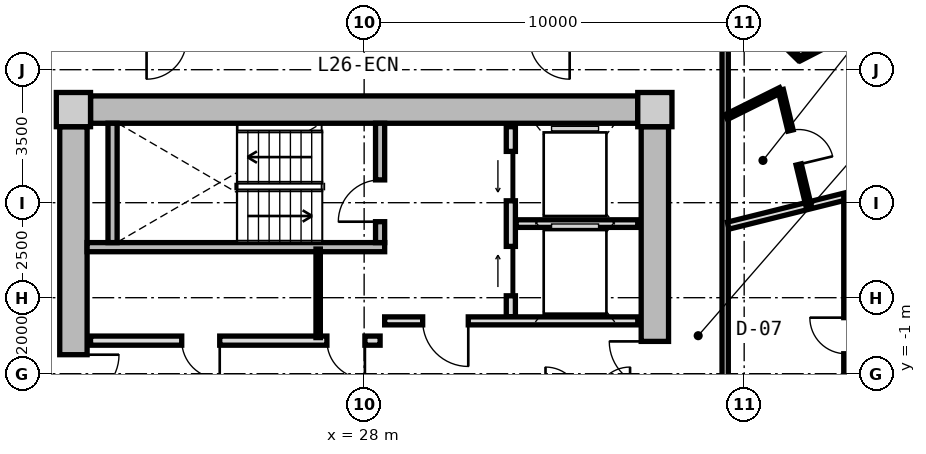
"""IFC4 building model, lengths in metres.
Left out: names, types, materials, properties, quantities, classifications, styles, units other than length and angle.
Written with IfcOpenShell. Run it as: python <this file> out.ifc"""

import sys

from ifc_helpers import new_model, si_unit, direction, frame, frame_2d, origin, origin_2d, place, context, subcontext, project, spatial, rectangle, extrude, source, transform, mapped, element, fill, save


model = new_model("IFC4")
c1 = context("Model", 3, precision=1e-05, world=origin(), true_north=direction((0.0, 1.0)))
c2 = subcontext(c1, "Body", "Model", "MODEL_VIEW")
j1 = project(units=[si_unit("LENGTHUNIT", "METRE"), si_unit("PLANEANGLEUNIT", "RADIAN")], contexts=[c1])
p1 = place(None, origin())
s1 = spatial("IfcSite", under=j1, at=p1, CompositionType="ELEMENT")
p2 = place(p1, origin())
s2 = spatial("IfcBuilding", under=s1, at=p2, CompositionType="ELEMENT")
p3 = place(p2, frame((0.0, 0.0, 87.1)))
s3 = spatial("IfcBuildingStorey", under=s2, at=p3, CompositionType="ELEMENT", Elevation=87.1)
m1 = source(origin(), c2, "Body", "SweptSolid", [
    extrude(rectangle(XDim=0.9, YDim=0.9, at=origin_2d()), origin(), (0.0, 0.0, 1.0), 3.05),
])
for number, where, z_axis, x_axis in (
    (1, (35.65, 5.95, 0.0), (0.0, 0.0, 1.0), (1.0, 0.0, 0.0)),
    (2, (20.35, 5.95, 0.0), (0.0, 0.0, 1.0), (1.0, 0.0, 0.0)),
):
    element("IfcColumn", number, at=place(p3, frame(where, z_axis=z_axis, x_axis=x_axis)), inside=s3, PredefinedType="COLUMN", context=c2, shape_type="MappedRepresentation", body=[
        mapped(m1, transform((0.0, 0.0, 0.0), x_axis=(1.0, 0.0, 0.0), y_axis=(0.0, 1.0, 0.0), z_axis=(0.0, 0.0, 1.0), scale=1.0)),
    ])
m2 = source(origin(), c2, "Body", "SweptSolid", [
    extrude(rectangle(XDim=14.4, YDim=0.72, at=frame_2d((7.2, 0.0))), origin(), (0.0, 0.0, 1.0), 2.79),
])
p4 = place(p3, frame((20.8, 5.95, 0.0), z_axis=(0.0, 0.0, 1.0), x_axis=(1.0, 0.0, 0.0)))
e3 = element("IfcWall", 3, at=p4, inside=s3, PredefinedType="SHEAR", context=c2, shape_type="MappedRepresentation", body=[
    mapped(m2, transform((0.0, 0.0, 0.0), x_axis=(1.0, 0.0, 0.0), y_axis=(0.0, 1.0, 0.0), z_axis=(0.0, 0.0, 1.0), scale=1.0)),
])
m3 = source(origin(), c2, "Body", "SweptSolid", [
    extrude(rectangle(XDim=11.0, YDim=0.72, at=frame_2d((5.5, 0.0))), origin(), (0.0, 0.0, 1.0), 2.79),
])
p5 = place(p3, frame((20.35, -5.5, 0.0), z_axis=(0.0, 0.0, 1.0), x_axis=(0.0, 1.0, 0.0)))
e4 = element("IfcWall", 4, at=p5, inside=s3, PredefinedType="SHEAR", context=c2, shape_type="MappedRepresentation", body=[
    mapped(m3, transform((0.0, 0.0, 0.0), x_axis=(1.0, 0.0, 0.0), y_axis=(0.0, 1.0, 0.0), z_axis=(0.0, 0.0, 1.0), scale=1.0)),
])
p6 = place(p5, frame((3.8, 0.0, 0.0)))
e5 = element("IfcOpeningElement", 5, at=p6, cuts=e4, PredefinedType="OPENING", context=c2, shape_type="SweptSolid", body=[
    extrude(rectangle(XDim=1.2, YDim=2.15, at=frame_2d((0.6, 1.075))), frame((0.0, 0.37, 0.0), z_axis=(0.0, -1.0, 0.0), x_axis=(1.0, 0.0, 0.0)), (0.0, 0.0, 1.0), 0.74),
])
p7 = place(p3, frame((35.65, 5.5, 0.0), z_axis=(0.0, 0.0, 1.0), x_axis=(0.0, -1.0, 0.0)))
e6 = element("IfcWall", 6, at=p7, inside=s3, PredefinedType="SHEAR", context=c2, shape_type="MappedRepresentation", body=[
    mapped(m3, transform((0.0, 0.0, 0.0), x_axis=(1.0, 0.0, 0.0), y_axis=(0.0, 1.0, 0.0), z_axis=(0.0, 0.0, 1.0), scale=1.0)),
])
p8 = place(p7, frame((5.65, 0.0, 0.0)))
e7 = element("IfcOpeningElement", 7, at=p8, cuts=e6, PredefinedType="OPENING", context=c2, shape_type="SweptSolid", body=[
    extrude(rectangle(XDim=1.2, YDim=2.15, at=frame_2d((0.6, 1.075))), frame((0.0, 0.37, 0.0), z_axis=(0.0, -1.0, 0.0), x_axis=(1.0, 0.0, 0.0)), (0.0, 0.0, 1.0), 0.74),
])
m4 = source(origin(), c2, "Body", "SweptSolid", [
    extrude(rectangle(XDim=7.83, YDim=0.24, at=frame_2d((3.915, 0.0))), origin(), (0.0, 0.0, 1.0), 2.79),
])
p9 = place(p3, frame((20.71, 2.33, 0.0), z_axis=(0.0, 0.0, 1.0), x_axis=(1.0, 0.0, 0.0)))
e8 = element("IfcWall", 8, at=p9, inside=s3, PredefinedType="PARTITIONING", context=c2, shape_type="MappedRepresentation", body=[
    mapped(m4, transform((0.0, 0.0, 0.0), x_axis=(1.0, 0.0, 0.0), y_axis=(0.0, 1.0, 0.0), z_axis=(0.0, 0.0, 1.0), scale=1.0)),
])
m5 = source(origin(), c2, "Body", "SweptSolid", [
    extrude(rectangle(XDim=3.14, YDim=0.24, at=frame_2d((1.57, 0.0))), origin(), (0.0, 0.0, 1.0), 2.79),
])
p10 = place(p3, frame((21.38, 2.45, 0.0), z_axis=(0.0, 0.0, 1.0), x_axis=(0.0, 1.0, 0.0)))
e9 = element("IfcWall", 9, at=p10, inside=s3, PredefinedType="PARTITIONING", context=c2, shape_type="MappedRepresentation", body=[
    mapped(m5, transform((0.0, 0.0, 0.0), x_axis=(1.0, 0.0, 0.0), y_axis=(0.0, 1.0, 0.0), z_axis=(0.0, 0.0, 1.0), scale=1.0)),
])
p11 = place(p3, frame((28.42, 2.45, 0.0), z_axis=(0.0, 0.0, 1.0), x_axis=(0.0, 1.0, 0.0)))
e10 = element("IfcWall", 10, at=p11, inside=s3, PredefinedType="PARTITIONING", context=c2, shape_type="MappedRepresentation", body=[
    mapped(m5, transform((0.0, 0.0, 0.0), x_axis=(1.0, 0.0, 0.0), y_axis=(0.0, 1.0, 0.0), z_axis=(0.0, 0.0, 1.0), scale=1.0)),
])
p12 = place(p11, frame((0.55, 0.0, 0.0)))
e11 = element("IfcOpeningElement", 11, at=p12, cuts=e10, PredefinedType="OPENING", context=c2, shape_type="SweptSolid", body=[
    extrude(rectangle(XDim=1.1, YDim=2.15, at=frame_2d((0.55, 1.075))), frame((0.0, 0.13, 0.0), z_axis=(0.0, -1.0, 0.0), x_axis=(1.0, 0.0, 0.0)), (0.0, 0.0, 1.0), 0.26),
])
m6 = source(origin(), c2, "Body", "SweptSolid", [
    extrude(rectangle(XDim=5.0, YDim=0.24, at=frame_2d((2.5, 0.0))), origin(), (0.0, 0.0, 1.0), 2.775),
])
p13 = place(p3, frame((31.86, 0.5, 0.0), z_axis=(0.0, 0.0, 1.0), x_axis=(0.0, 1.0, 0.0)))
e12 = element("IfcWall", 12, at=p13, inside=s3, PredefinedType="PARTITIONING", context=c2, shape_type="MappedRepresentation", body=[
    mapped(m6, transform((0.0, 0.0, 0.0), x_axis=(1.0, 0.0, 0.0), y_axis=(0.0, 1.0, 0.0), z_axis=(0.0, 0.0, 1.0), scale=1.0)),
])
p14 = place(p13, frame((3.05, 0.0, 0.0)))
e13 = element("IfcOpeningElement", 13, at=p14, cuts=e12, PredefinedType="OPENING", context=c2, shape_type="SweptSolid", body=[
    extrude(rectangle(XDim=1.3, YDim=2.2, at=frame_2d((0.65, 1.1))), frame((0.0, 0.13, 0.0), z_axis=(0.0, -1.0, 0.0), x_axis=(1.0, 0.0, 0.0)), (0.0, 0.0, 1.0), 0.26),
])
p15 = place(p13, frame((0.55, 0.0, 0.0)))
e14 = element("IfcOpeningElement", 14, at=p15, cuts=e12, PredefinedType="OPENING", context=c2, shape_type="SweptSolid", body=[
    extrude(rectangle(XDim=1.3, YDim=2.2, at=frame_2d((0.65, 1.1))), frame((0.0, 0.13, 0.0), z_axis=(0.0, -1.0, 0.0), x_axis=(1.0, 0.0, 0.0)), (0.0, 0.0, 1.0), 0.26),
])
m7 = source(origin(), c2, "Body", "SweptSolid", [
    extrude(rectangle(XDim=3.2, YDim=0.2, at=frame_2d((1.6, 0.0))), origin(), (0.0, 0.0, 1.0), 2.775),
])
p16 = place(p3, frame((32.0, 2.95, 0.0), z_axis=(0.0, 0.0, 1.0), x_axis=(1.0, 0.0, 0.0)))
e15 = element("IfcWall", 15, at=p16, inside=s3, PredefinedType="PARTITIONING", context=c2, shape_type="MappedRepresentation", body=[
    mapped(m7, transform((0.0, 0.0, 0.0), x_axis=(1.0, 0.0, 0.0), y_axis=(0.0, 1.0, 0.0), z_axis=(0.0, 0.0, 1.0), scale=1.0)),
])
m8 = source(origin(), c2, "Body", "SweptSolid", [
    extrude(rectangle(XDim=6.66, YDim=0.21, at=frame_2d((3.33, 0.0))), origin(), (0.0, 0.0, 1.0), 2.775),
])
p17 = place(p3, frame((28.54, 0.39, 0.0), z_axis=(0.0, 0.0, 1.0), x_axis=(1.0, 0.0, 0.0)))
e16 = element("IfcWall", 16, at=p17, inside=s3, PredefinedType="PARTITIONING", context=c2, shape_type="MappedRepresentation", body=[
    mapped(m8, transform((0.0, 0.0, 0.0), x_axis=(1.0, 0.0, 0.0), y_axis=(0.0, 1.0, 0.0), z_axis=(0.0, 0.0, 1.0), scale=1.0)),
])
p18 = place(p17, frame((1.0, 0.0, 0.0)))
e17 = element("IfcOpeningElement", 17, at=p18, cuts=e16, PredefinedType="OPENING", context=c2, shape_type="SweptSolid", body=[
    extrude(rectangle(XDim=1.2, YDim=2.15, at=frame_2d((0.6, 1.075))), frame((0.0, 0.115, 0.0), z_axis=(0.0, -1.0, 0.0), x_axis=(1.0, 0.0, 0.0)), (0.0, 0.0, 1.0), 0.23),
])
m9 = source(origin(), c2, "Body", "SweptSolid", [
    extrude(rectangle(XDim=7.62, YDim=0.24, at=frame_2d((3.81, 0.0))), origin(), (0.0, 0.0, 1.0), 2.775),
])
p19 = place(p3, frame((20.8, -0.13, 0.0), z_axis=(0.0, 0.0, 1.0), x_axis=(1.0, 0.0, 0.0)))
e18 = element("IfcWall", 18, at=p19, inside=s3, PredefinedType="PARTITIONING", context=c2, shape_type="MappedRepresentation", body=[
    mapped(m9, transform((0.0, 0.0, 0.0), x_axis=(1.0, 0.0, 0.0), y_axis=(0.0, 1.0, 0.0), z_axis=(0.0, 0.0, 1.0), scale=1.0)),
])
p20 = place(p19, frame((6.22, 0.0, 0.0)))
e19 = element("IfcOpeningElement", 19, at=p20, cuts=e18, PredefinedType="OPENING", context=c2, shape_type="SweptSolid", body=[
    extrude(rectangle(XDim=1.0, YDim=2.1, at=frame_2d((0.5, 1.05))), frame((0.0, 0.13, 0.0), z_axis=(0.0, -1.0, 0.0), x_axis=(1.0, 0.0, 0.0)), (0.0, 0.0, 1.0), 0.26),
])
p21 = place(p19, frame((2.4, 0.0, 0.0)))
e20 = element("IfcOpeningElement", 20, at=p21, cuts=e18, PredefinedType="OPENING", context=c2, shape_type="SweptSolid", body=[
    extrude(rectangle(XDim=1.0, YDim=2.1, at=frame_2d((0.5, 1.05))), frame((0.0, 0.13, 0.0), z_axis=(0.0, -1.0, 0.0), x_axis=(1.0, 0.0, 0.0)), (0.0, 0.0, 1.0), 0.26),
])
m10 = source(origin(), c2, "Body", "SweptSolid", [
    extrude(rectangle(XDim=2.33, YDim=0.115, at=frame_2d((1.165, 0.0))), origin(), (0.0, 0.0, 1.0), 2.775),
])
p22 = place(p3, frame((26.79, -0.05, 0.0), z_axis=(0.0, 0.0, 1.0), x_axis=(0.0, 1.0, 0.0)))
e21 = element("IfcWall", 21, at=p22, inside=s3, PredefinedType="PARTITIONING", context=c2, shape_type="MappedRepresentation", body=[
    mapped(m10, transform((0.0, 0.0, 0.0), x_axis=(1.0, 0.0, 0.0), y_axis=(0.0, 1.0, 0.0), z_axis=(0.0, 0.0, 1.0), scale=1.0)),
])
m11 = source(origin(), c2, "Body", "SweptSolid", [
    extrude(rectangle(XDim=15.6, YDim=0.165, at=frame_2d((7.8, 0.0))), origin(), (0.0, 0.0, 1.0), 2.775),
])
p23 = place(p3, frame((37.5, 7.8, 0.0), z_axis=(0.0, 0.0, 1.0), x_axis=(0.0, -1.0, 0.0)))
e22 = element("IfcWall", 22, at=p23, inside=s3, PredefinedType="PARTITIONING", context=c2, shape_type="MappedRepresentation", body=[
    mapped(m11, transform((0.0, 0.0, 0.0), x_axis=(1.0, 0.0, 0.0), y_axis=(0.0, 1.0, 0.0), z_axis=(0.0, 0.0, 1.0), scale=1.0)),
])
p24 = place(p23, frame((9.177, 0.0, 0.0)))
e23 = element("IfcOpeningElement", 23, at=p24, cuts=e22, PredefinedType="OPENING", context=c2, shape_type="SweptSolid", body=[
    extrude(rectangle(XDim=1.05, YDim=2.15, at=frame_2d((0.525, 1.075))), frame((0.0, 0.093, 0.0), z_axis=(0.0, -1.0, 0.0), x_axis=(1.0, 0.0, 0.0)), (0.0, 0.0, 1.0), 0.185),
])
m12 = source(origin(), c2, "Body", "SweptSolid", [
    extrude(rectangle(XDim=6.331, YDim=0.19, at=frame_2d((3.165, 0.0))), origin(), (0.0, 0.0, 1.0), 2.275),
])
p25 = place(p3, frame((37.58, 2.896, 0.0), z_axis=(0.0, 0.0, 1.0), x_axis=(0.97036440661, 0.241646267062, 0.0)))
e24 = element("IfcWall", 24, at=p25, inside=s3, PredefinedType="PARTITIONING", context=c2, shape_type="MappedRepresentation", body=[
    mapped(m12, transform((0.0, 0.0, 0.0), x_axis=(1.0, 0.0, 0.0), y_axis=(0.0, 1.0, 0.0), z_axis=(0.0, 0.0, 1.0), scale=1.0)),
])
m13 = source(origin(), c2, "Body", "SweptSolid", [
    extrude(rectangle(XDim=7.375, YDim=0.115, at=frame_2d((3.688, 0.0))), origin(), (0.0, 0.0, 1.0), 2.775),
])
p26 = place(p3, frame((40.678, -3.688, 0.0), z_axis=(0.0, 0.0, 1.0), x_axis=(0.0, 1.0, 0.0)))
e25 = element("IfcWall", 25, at=p26, inside=s3, PredefinedType="PARTITIONING", context=c2, shape_type="MappedRepresentation", body=[
    mapped(m13, transform((0.0, 0.0, 0.0), x_axis=(1.0, 0.0, 0.0), y_axis=(0.0, 1.0, 0.0), z_axis=(0.0, 0.0, 1.0), scale=1.0)),
])
p27 = place(p26, frame((3.213, 0.0, 0.0)))
e26 = element("IfcOpeningElement", 26, at=p27, cuts=e25, PredefinedType="OPENING", context=c2, shape_type="SweptSolid", body=[
    extrude(rectangle(XDim=0.95, YDim=2.1, at=frame_2d((0.475, 1.05))), frame((0.0, 0.067, 0.0), z_axis=(0.0, -1.0, 0.0), x_axis=(1.0, 0.0, 0.0)), (0.0, 0.0, 1.0), 0.135),
])
m14 = source(origin(), c2, "Body", "SweptSolid", [
    extrude(rectangle(XDim=1.6, YDim=0.14, at=frame_2d((0.8, 0.0))), origin(), (0.0, 0.0, 1.0), 2.775),
])
p28 = place(p3, frame((37.53, 5.754, 0.0), z_axis=(0.0, 0.0, 1.0), x_axis=(0.895522919837, 0.445015393044, 0.0)))
e27 = element("IfcWall", 27, at=p28, inside=s3, PredefinedType="PARTITIONING", context=c2, shape_type="MappedRepresentation", body=[
    mapped(m14, transform((0.0, 0.0, 0.0), x_axis=(1.0, 0.0, 0.0), y_axis=(0.0, 1.0, 0.0), z_axis=(0.0, 0.0, 1.0), scale=1.0)),
])
m15 = source(origin(), c2, "Body", "SweptSolid", [
    extrude(rectangle(XDim=3.112, YDim=0.14, at=frame_2d((1.556, 0.0))), origin(), (0.0, 0.0, 1.0), 2.415),
])
p29 = place(p3, frame((38.963, 6.466, 0.0), z_axis=(0.0, 0.0, 1.0), x_axis=(0.233737944029, -0.972299631555, 0.0)))
e28 = element("IfcWall", 28, at=p29, inside=s3, PredefinedType="PARTITIONING", context=c2, shape_type="MappedRepresentation", body=[
    mapped(m15, transform((0.0, 0.0, 0.0), x_axis=(1.0, 0.0, 0.0), y_axis=(0.0, 1.0, 0.0), z_axis=(0.0, 0.0, 1.0), scale=1.0)),
])
p30 = place(p29, frame((1.096, 0.0, 0.0)))
e29 = element("IfcOpeningElement", 29, at=p30, cuts=e28, PredefinedType="OPENING", context=c2, shape_type="SweptSolid", body=[
    extrude(rectangle(XDim=0.92, YDim=2.1, at=frame_2d((0.46, 1.05))), frame((0.0, 0.08, 0.0), z_axis=(0.0, -1.0, 0.0), x_axis=(1.0, 0.0, 0.0)), (0.0, 0.0, 1.0), 0.16),
])
m16 = source(origin(), c2, "Body", "SweptSolid", [
    extrude(rectangle(XDim=2.117, YDim=0.115, at=frame_2d((1.059, 0.0))), origin(), (0.0, 0.0, 1.0), 2.775),
])
p31 = place(p3, frame((39.46, 7.289, 0.0), z_axis=(0.0, 0.0, 1.0), x_axis=(0.888941834945, 0.45802010227, 0.0)))
e30 = element("IfcWall", 30, at=p31, inside=s3, PredefinedType="PARTITIONING", context=c2, shape_type="MappedRepresentation", body=[
    mapped(m16, transform((0.0, 0.0, 0.0), x_axis=(1.0, 0.0, 0.0), y_axis=(0.0, 1.0, 0.0), z_axis=(0.0, 0.0, 1.0), scale=1.0)),
])
m17 = source(origin(), c2, "Body", "SweptSolid", [
    extrude(rectangle(XDim=3.902, YDim=0.115, at=frame_2d((1.951, 0.0))), origin(), (0.0, 0.0, 1.0), 2.775),
])
p32 = place(p3, frame((39.46, 7.289, 0.0), z_axis=(0.0, 0.0, 1.0), x_axis=(-0.714853061854, 0.699274695637, 0.0)))
e31 = element("IfcWall", 31, at=p32, inside=s3, PredefinedType="PARTITIONING", context=c2, shape_type="MappedRepresentation", body=[
    mapped(m17, transform((0.0, 0.0, 0.0), x_axis=(1.0, 0.0, 0.0), y_axis=(0.0, 1.0, 0.0), z_axis=(0.0, 0.0, 1.0), scale=1.0)),
])
p33 = place(p32, frame((1.476, 0.0, 0.0)))
e32 = element("IfcOpeningElement", 32, at=p33, cuts=e31, PredefinedType="OPENING", context=c2, shape_type="SweptSolid", body=[
    extrude(rectangle(XDim=0.95, YDim=2.1, at=frame_2d((0.475, 1.05))), frame((0.0, 0.067, 0.0), z_axis=(0.0, -1.0, 0.0), x_axis=(1.0, 0.0, 0.0)), (0.0, 0.0, 1.0), 0.135),
])
m18 = source(origin(), c2, "Body", "SweptSolid", [
    extrude(rectangle(XDim=1.1, YDim=2.15, at=frame_2d((0.55, 1.075))), frame((0.0, 0.025, 0.0), z_axis=(0.0, -1.0, 0.0), x_axis=(1.0, 0.0, 0.0)), (0.0, 0.0, 1.0), 0.05),
])
p34 = place(p12, origin())
e33 = element("IfcDoor", 33, at=p34, inside=s3, OperationType="SINGLE_SWING_LEFT", PredefinedType="DOOR", context=c2, shape_type="MappedRepresentation", body=[
    mapped(m18, transform((0.0, 0.0, 0.0), x_axis=(1.0, 0.0, 0.0), y_axis=(0.0, 1.0, 0.0), z_axis=(0.0, 0.0, 1.0), scale=1.0)),
])
fill(e11, e33)
m19 = source(origin(), c2, "Body", "SweptSolid", [
    extrude(rectangle(XDim=1.3, YDim=2.2, at=frame_2d((0.65, 1.1))), frame((0.0, 0.025, 0.0), z_axis=(0.0, -1.0, 0.0), x_axis=(1.0, 0.0, 0.0)), (0.0, 0.0, 1.0), 0.05),
])
p35 = place(p14, origin())
e34 = element("IfcDoor", 34, at=p35, inside=s3, OperationType="SLIDING_TO_LEFT", PredefinedType="DOOR", context=c2, shape_type="MappedRepresentation", body=[
    mapped(m19, transform((0.0, 0.0, 0.0), x_axis=(1.0, 0.0, 0.0), y_axis=(0.0, 1.0, 0.0), z_axis=(0.0, 0.0, 1.0), scale=1.0)),
])
fill(e13, e34)
p36 = place(p15, origin())
e35 = element("IfcDoor", 35, at=p36, inside=s3, OperationType="SLIDING_TO_RIGHT", PredefinedType="DOOR", context=c2, shape_type="MappedRepresentation", body=[
    mapped(m19, transform((0.0, 0.0, 0.0), x_axis=(1.0, 0.0, 0.0), y_axis=(0.0, 1.0, 0.0), z_axis=(0.0, 0.0, 1.0), scale=1.0)),
])
fill(e14, e35)
m20 = source(origin(), c2, "Body", "SweptSolid", [
    extrude(rectangle(XDim=1.2, YDim=2.15, at=frame_2d((0.6, 1.075))), frame((0.0, 0.025, 0.0), z_axis=(0.0, -1.0, 0.0), x_axis=(1.0, 0.0, 0.0)), (0.0, 0.0, 1.0), 0.05),
])
p37 = place(p18, frame((1.2, 0.0, 0.0), z_axis=(0.0, 0.0, 1.0), x_axis=(-1.0, 0.0, 0.0)))
e36 = element("IfcDoor", 36, at=p37, inside=s3, OperationType="SINGLE_SWING_LEFT", PredefinedType="DOOR", context=c2, shape_type="MappedRepresentation", body=[
    mapped(m20, transform((0.0, 0.0, 0.0), x_axis=(1.0, 0.0, 0.0), y_axis=(0.0, 1.0, 0.0), z_axis=(0.0, 0.0, 1.0), scale=1.0)),
])
fill(e17, e36)
p38 = place(p6, frame((1.2, 0.0, 0.0), z_axis=(0.0, 0.0, 1.0), x_axis=(-1.0, 0.0, 0.0)))
e37 = element("IfcDoor", 37, at=p38, inside=s3, OperationType="SINGLE_SWING_LEFT", PredefinedType="DOOR", context=c2, shape_type="MappedRepresentation", body=[
    mapped(m20, transform((0.0, 0.0, 0.0), x_axis=(1.0, 0.0, 0.0), y_axis=(0.0, 1.0, 0.0), z_axis=(0.0, 0.0, 1.0), scale=1.0)),
])
fill(e5, e37)
p39 = place(p8, frame((1.2, 0.0, 0.0), z_axis=(0.0, 0.0, 1.0), x_axis=(-1.0, 0.0, 0.0)))
e38 = element("IfcDoor", 38, at=p39, inside=s3, OperationType="SINGLE_SWING_RIGHT", PredefinedType="DOOR", context=c2, shape_type="MappedRepresentation", body=[
    mapped(m20, transform((0.0, 0.0, 0.0), x_axis=(1.0, 0.0, 0.0), y_axis=(0.0, 1.0, 0.0), z_axis=(0.0, 0.0, 1.0), scale=1.0)),
])
fill(e7, e38)
m21 = source(origin(), c2, "Body", "SweptSolid", [
    extrude(rectangle(XDim=1.0, YDim=2.1, at=frame_2d((0.5, 1.05))), frame((0.0, 0.025, 0.0), z_axis=(0.0, -1.0, 0.0), x_axis=(1.0, 0.0, 0.0)), (0.0, 0.0, 1.0), 0.05),
])
p40 = place(p20, frame((1.0, 0.0, 0.0), z_axis=(0.0, 0.0, 1.0), x_axis=(-1.0, 0.0, 0.0)))
e39 = element("IfcDoor", 39, at=p40, inside=s3, OperationType="SINGLE_SWING_LEFT", PredefinedType="DOOR", context=c2, shape_type="MappedRepresentation", body=[
    mapped(m21, transform((0.0, 0.0, 0.0), x_axis=(1.0, 0.0, 0.0), y_axis=(0.0, 1.0, 0.0), z_axis=(0.0, 0.0, 1.0), scale=1.0)),
])
fill(e19, e39)
p41 = place(p21, frame((1.0, 0.0, 0.0), z_axis=(0.0, 0.0, 1.0), x_axis=(-1.0, 0.0, 0.0)))
e40 = element("IfcDoor", 40, at=p41, inside=s3, OperationType="SINGLE_SWING_LEFT", PredefinedType="DOOR", context=c2, shape_type="MappedRepresentation", body=[
    mapped(m21, transform((0.0, 0.0, 0.0), x_axis=(1.0, 0.0, 0.0), y_axis=(0.0, 1.0, 0.0), z_axis=(0.0, 0.0, 1.0), scale=1.0)),
])
fill(e20, e40)
m22 = source(origin(), c2, "Body", "SweptSolid", [
    extrude(rectangle(XDim=0.95, YDim=2.1, at=frame_2d((0.475, 1.05))), frame((0.0, 0.025, 0.0), z_axis=(0.0, -1.0, 0.0), x_axis=(1.0, 0.0, 0.0)), (0.0, 0.0, 1.0), 0.05),
])
p42 = place(p27, origin())
e41 = element("IfcDoor", 41, at=p42, inside=s3, OperationType="SINGLE_SWING_RIGHT", PredefinedType="DOOR", context=c2, shape_type="MappedRepresentation", body=[
    mapped(m22, transform((0.0, 0.0, 0.0), x_axis=(1.0, 0.0, 0.0), y_axis=(0.0, 1.0, 0.0), z_axis=(0.0, 0.0, 1.0), scale=1.0)),
])
fill(e26, e41)
m23 = source(origin(), c2, "Body", "SweptSolid", [
    extrude(rectangle(XDim=0.92, YDim=2.1, at=frame_2d((0.46, 1.05))), frame((0.0, 0.025, 0.0), z_axis=(0.0, -1.0, 0.0), x_axis=(1.0, 0.0, 0.0)), (0.0, 0.0, 1.0), 0.05),
])
p43 = place(p30, origin())
e42 = element("IfcDoor", 42, at=p43, inside=s3, OperationType="SINGLE_SWING_RIGHT", PredefinedType="DOOR", context=c2, shape_type="MappedRepresentation", body=[
    mapped(m23, transform((0.0, 0.0, 0.0), x_axis=(1.0, 0.0, 0.0), y_axis=(0.0, 1.0, 0.0), z_axis=(0.0, 0.0, 1.0), scale=1.0)),
])
fill(e29, e42)
save(model, sys.argv[1])
